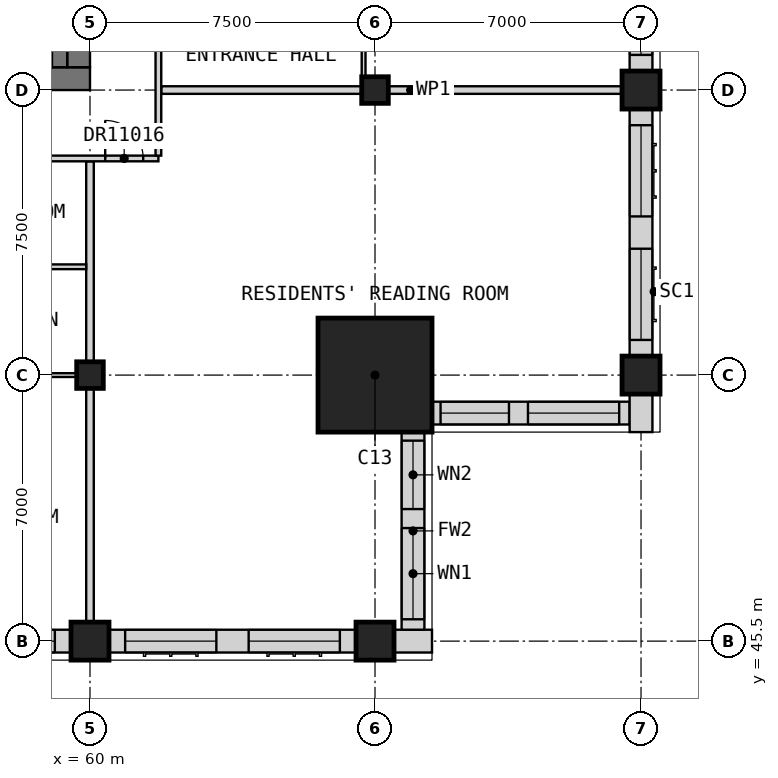
"""IFC4 building model, lengths in metres.
Left out: names, types, materials, properties, quantities, classifications, styles, units other than length and angle.
Written with IfcOpenShell. Run it as: python <this file> out.ifc"""

import sys

from ifc_helpers import new_model, si_unit, direction, frame, frame_2d, origin, origin_2d, place, context, subcontext, project, spatial, rectangle, extrude, element, fill, save


model = new_model("IFC4")
c1 = context("Model", 3, precision=1e-05, world=origin(), true_north=direction((0.0, 1.0)))
c2 = subcontext(c1, "Body", "Model", "MODEL_VIEW")
j1 = project(units=[si_unit("LENGTHUNIT", "METRE"), si_unit("PLANEANGLEUNIT", "RADIAN")], contexts=[c1])
p1 = place(None, origin())
s1 = spatial("IfcSite", under=j1, at=p1, CompositionType="ELEMENT")
p2 = place(p1, origin())
s2 = spatial("IfcBuilding", under=s1, at=p2, CompositionType="ELEMENT")
p3 = place(p2, frame((0.0, 0.0, 276.7)))
s3 = spatial("IfcBuildingStorey", under=s2, at=p3, CompositionType="ELEMENT", Elevation=276.7)
p4 = place(p3, frame((60.0, 45.5, 0.0), z_axis=(0.0, 0.0, 1.0), x_axis=(1.0, 0.0, 0.0)))
e1 = element("IfcColumn", 1, at=p4, inside=s3, PredefinedType="COLUMN", context=c2, shape_type="SweptSolid", body=[
    extrude(rectangle(XDim=1.0, YDim=1.0, at=origin_2d()), origin(), (0.0, 0.0, 1.0), 3.5),
])
p5 = place(p3, frame((60.0, 52.5, 0.0), z_axis=(0.0, 0.0, 1.0), x_axis=(1.0, 0.0, 0.0)))
e2 = element("IfcColumn", 2, at=p5, inside=s3, PredefinedType="COLUMN", context=c2, shape_type="SweptSolid", body=[
    extrude(rectangle(XDim=0.7, YDim=0.7, at=origin_2d()), origin(), (0.0, 0.0, 1.0), 3.5),
])
p6 = place(p3, frame((67.5, 45.5, 0.0), z_axis=(0.0, 0.0, 1.0), x_axis=(1.0, 0.0, 0.0)))
e3 = element("IfcColumn", 3, at=p6, inside=s3, PredefinedType="COLUMN", context=c2, shape_type="SweptSolid", body=[
    extrude(rectangle(XDim=1.0, YDim=1.0, at=origin_2d()), origin(), (0.0, 0.0, 1.0), 3.5),
])
p7 = place(p3, frame((67.5, 60.0, 0.0), z_axis=(0.0, 0.0, 1.0), x_axis=(1.0, 0.0, 0.0)))
e4 = element("IfcColumn", 4, at=p7, inside=s3, PredefinedType="COLUMN", context=c2, shape_type="SweptSolid", body=[
    extrude(rectangle(XDim=0.7, YDim=0.7, at=origin_2d()), origin(), (0.0, 0.0, 1.0), 3.5),
])
for number, where, z_axis, x_axis in (
    (5, (74.5, 52.5, 0.0), (0.0, 0.0, 1.0), (1.0, 0.0, 0.0)),
    (6, (74.5, 60.0, 0.0), (0.0, 0.0, 1.0), (1.0, 0.0, 0.0)),
):
    element("IfcColumn", number, at=place(p3, frame(where, z_axis=z_axis, x_axis=x_axis)), inside=s3, PredefinedType="COLUMN", context=c2, shape_type="SweptSolid", body=[
        extrude(rectangle(XDim=1.0, YDim=1.0, at=origin_2d()), origin(), (0.0, 0.0, 1.0), 3.5),
    ])
p8 = place(p3, frame((67.5, 52.5, 0.0), z_axis=(0.0, 0.0, 1.0), x_axis=(1.0, 0.0, 0.0)))
e7 = element("IfcColumn", 7, at=p8, inside=s3, PredefinedType="COLUMN", context=c2, shape_type="SweptSolid", body=[
    extrude(rectangle(XDim=3.0, YDim=3.0, at=origin_2d()), origin(), (0.0, 0.0, 1.0), 3.5),
])
p9 = place(p3, frame((30.0, 60.3, 0.0), z_axis=(0.0, 0.0, 1.0), x_axis=(1.0, 0.0, 0.0)))
e8 = element("IfcWall", 8, at=p9, inside=s3, PredefinedType="SHEAR", context=c2, shape_type="SweptSolid", body=[
    extrude(rectangle(XDim=30.0, YDim=0.6, at=frame_2d((15.0, 0.0))), origin(), (0.0, 0.0, 1.0), 3.5),
])
p10 = place(p9, frame((21.9, 0.0, 0.0)))
e9 = element("IfcOpeningElement", 9, at=p10, cuts=e8, PredefinedType="OPENING", context=c2, shape_type="SweptSolid", body=[
    extrude(rectangle(XDim=1.8, YDim=2.1, at=frame_2d((0.9, 1.05))), frame((0.0, 0.31, 0.0), z_axis=(0.0, -1.0, 0.0), x_axis=(1.0, 0.0, 0.0)), (0.0, 0.0, 1.0), 0.62),
])
p11 = place(p9, frame((26.5, 0.0, 0.0)))
e10 = element("IfcOpeningElement", 10, at=p11, cuts=e8, PredefinedType="OPENING", context=c2, shape_type="SweptSolid", body=[
    extrude(rectangle(XDim=1.2, YDim=2.1, at=frame_2d((0.6, 1.05))), frame((0.0, 0.31, 0.0), z_axis=(0.0, -1.0, 0.0), x_axis=(1.0, 0.0, 0.0)), (0.0, 0.0, 1.0), 0.62),
])
p12 = place(p3, frame((59.7, 60.6, 0.0), z_axis=(0.0, 0.0, 1.0), x_axis=(0.0, 1.0, 0.0)))
e11 = element("IfcWall", 11, at=p12, inside=s3, PredefinedType="SHEAR", context=c2, shape_type="SweptSolid", body=[
    extrude(rectangle(XDim=21.3, YDim=0.6, at=frame_2d((10.65, 0.0))), origin(), (0.0, 0.0, 1.0), 3.5),
])
p13 = place(p12, frame((14.9, 0.0, 0.0)))
e12 = element("IfcOpeningElement", 12, at=p13, cuts=e11, PredefinedType="OPENING", context=c2, shape_type="SweptSolid", body=[
    extrude(rectangle(XDim=1.8, YDim=2.1, at=frame_2d((0.9, 1.05))), frame((0.0, 0.31, 0.0), z_axis=(0.0, -1.0, 0.0), x_axis=(1.0, 0.0, 0.0)), (0.0, 0.0, 1.0), 0.62),
])
p14 = place(p3, frame((53.0, 45.5, 0.0), z_axis=(0.0, 0.0, 1.0), x_axis=(1.0, 0.0, 0.0)))
e13 = element("IfcWall", 13, at=p14, inside=s3, PredefinedType="SOLIDWALL", context=c2, shape_type="SweptSolid", body=[
    extrude(rectangle(XDim=6.5, YDim=0.6, at=frame_2d((3.25, 0.0))), origin(), (0.0, 0.0, 1.0), 2.75),
])
p15 = place(p14, frame((0.425, 0.0, 0.8)))
e14 = element("IfcOpeningElement", 14, at=p15, cuts=e13, PredefinedType="OPENING", context=c2, shape_type="SweptSolid", body=[
    extrude(rectangle(XDim=2.4, YDim=1.8, at=frame_2d((1.2, 0.9))), frame((0.0, 0.31, 0.0), z_axis=(0.0, -1.0, 0.0), x_axis=(1.0, 0.0, 0.0)), (0.0, 0.0, 1.0), 0.62),
])
p16 = place(p14, frame((3.675, 0.0, 0.8)))
e15 = element("IfcOpeningElement", 15, at=p16, cuts=e13, PredefinedType="OPENING", context=c2, shape_type="SweptSolid", body=[
    extrude(rectangle(XDim=2.4, YDim=1.8, at=frame_2d((1.2, 0.9))), frame((0.0, 0.31, 0.0), z_axis=(0.0, -1.0, 0.0), x_axis=(1.0, 0.0, 0.0)), (0.0, 0.0, 1.0), 0.62),
])
p17 = place(p3, frame((60.5, 45.5, 0.0), z_axis=(0.0, 0.0, 1.0), x_axis=(1.0, 0.0, 0.0)))
e16 = element("IfcWall", 16, at=p17, inside=s3, PredefinedType="SOLIDWALL", context=c2, shape_type="SweptSolid", body=[
    extrude(rectangle(XDim=6.5, YDim=0.6, at=frame_2d((3.25, 0.0))), origin(), (0.0, 0.0, 1.0), 2.75),
])
p18 = place(p17, frame((0.425, 0.0, 0.8)))
e17 = element("IfcOpeningElement", 17, at=p18, cuts=e16, PredefinedType="OPENING", context=c2, shape_type="SweptSolid", body=[
    extrude(rectangle(XDim=2.4, YDim=1.8, at=frame_2d((1.2, 0.9))), frame((0.0, 0.31, 0.0), z_axis=(0.0, -1.0, 0.0), x_axis=(1.0, 0.0, 0.0)), (0.0, 0.0, 1.0), 0.62),
])
p19 = place(p17, frame((3.675, 0.0, 0.8)))
e18 = element("IfcOpeningElement", 18, at=p19, cuts=e16, PredefinedType="OPENING", context=c2, shape_type="SweptSolid", body=[
    extrude(rectangle(XDim=2.4, YDim=1.8, at=frame_2d((1.2, 0.9))), frame((0.0, 0.31, 0.0), z_axis=(0.0, -1.0, 0.0), x_axis=(1.0, 0.0, 0.0)), (0.0, 0.0, 1.0), 0.62),
])
p20 = place(p3, frame((68.0, 45.5, 0.0), z_axis=(0.0, 0.0, 1.0), x_axis=(1.0, 0.0, 0.0)))
e19 = element("IfcWall", 19, at=p20, inside=s3, PredefinedType="SOLIDWALL", context=c2, shape_type="SweptSolid", body=[
    extrude(rectangle(XDim=1.0, YDim=0.6, at=frame_2d((0.5, 0.0))), origin(), (0.0, 0.0, 1.0), 3.25),
])
p21 = place(p3, frame((68.5, 45.8, 0.0), z_axis=(0.0, 0.0, 1.0), x_axis=(0.0, 1.0, 0.0)))
e20 = element("IfcWall", 20, at=p21, inside=s3, PredefinedType="SOLIDWALL", context=c2, shape_type="SweptSolid", body=[
    extrude(rectangle(XDim=5.2, YDim=0.6, at=frame_2d((2.6, 0.0))), origin(), (0.0, 0.0, 1.0), 3.25),
])
p22 = place(p21, frame((0.275, 0.0, 0.8)))
e21 = element("IfcOpeningElement", 21, at=p22, cuts=e20, PredefinedType="OPENING", context=c2, shape_type="SweptSolid", body=[
    extrude(rectangle(XDim=2.4, YDim=1.8, at=frame_2d((1.2, 0.9))), frame((0.0, 0.31, 0.0), z_axis=(0.0, -1.0, 0.0), x_axis=(1.0, 0.0, 0.0)), (0.0, 0.0, 1.0), 0.62),
])
p23 = place(p21, frame((3.175, 0.0, 0.8)))
e22 = element("IfcOpeningElement", 22, at=p23, cuts=e20, PredefinedType="OPENING", context=c2, shape_type="SweptSolid", body=[
    extrude(rectangle(XDim=1.8, YDim=1.8, at=frame_2d((0.9, 0.9))), frame((0.0, 0.31, 0.0), z_axis=(0.0, -1.0, 0.0), x_axis=(1.0, 0.0, 0.0)), (0.0, 0.0, 1.0), 0.62),
])
p24 = place(p3, frame((69.0, 51.5, 0.0), z_axis=(0.0, 0.0, 1.0), x_axis=(1.0, 0.0, 0.0)))
e23 = element("IfcWall", 23, at=p24, inside=s3, PredefinedType="SOLIDWALL", context=c2, shape_type="SweptSolid", body=[
    extrude(rectangle(XDim=5.2, YDim=0.6, at=frame_2d((2.6, 0.0))), origin(), (0.0, 0.0, 1.0), 3.25),
])
p25 = place(p24, frame((0.225, 0.0, 0.8)))
e24 = element("IfcOpeningElement", 24, at=p25, cuts=e23, PredefinedType="OPENING", context=c2, shape_type="SweptSolid", body=[
    extrude(rectangle(XDim=1.8, YDim=1.8, at=frame_2d((0.9, 0.9))), frame((0.0, 0.31, 0.0), z_axis=(0.0, -1.0, 0.0), x_axis=(1.0, 0.0, 0.0)), (0.0, 0.0, 1.0), 0.62),
])
p26 = place(p24, frame((2.525, 0.0, 0.8)))
e25 = element("IfcOpeningElement", 25, at=p26, cuts=e23, PredefinedType="OPENING", context=c2, shape_type="SweptSolid", body=[
    extrude(rectangle(XDim=2.4, YDim=1.8, at=frame_2d((1.2, 0.9))), frame((0.0, 0.31, 0.0), z_axis=(0.0, -1.0, 0.0), x_axis=(1.0, 0.0, 0.0)), (0.0, 0.0, 1.0), 0.62),
])
p27 = place(p3, frame((74.5, 51.0, 0.0), z_axis=(0.0, 0.0, 1.0), x_axis=(0.0, 1.0, 0.0)))
e26 = element("IfcWall", 26, at=p27, inside=s3, PredefinedType="SOLIDWALL", context=c2, shape_type="SweptSolid", body=[
    extrude(rectangle(XDim=1.0, YDim=0.6, at=frame_2d((0.5, 0.0))), origin(), (0.0, 0.0, 1.0), 3.25),
])
p28 = place(p3, frame((74.5, 53.0, 0.0), z_axis=(0.0, 0.0, 1.0), x_axis=(0.0, 1.0, 0.0)))
e27 = element("IfcWall", 27, at=p28, inside=s3, PredefinedType="SOLIDWALL", context=c2, shape_type="SweptSolid", body=[
    extrude(rectangle(XDim=6.5, YDim=0.6, at=frame_2d((3.25, 0.0))), origin(), (0.0, 0.0, 1.0), 2.75),
])
p29 = place(p28, frame((0.425, 0.0, 0.8)))
e28 = element("IfcOpeningElement", 28, at=p29, cuts=e27, PredefinedType="OPENING", context=c2, shape_type="SweptSolid", body=[
    extrude(rectangle(XDim=2.4, YDim=1.8, at=frame_2d((1.2, 0.9))), frame((0.0, 0.31, 0.0), z_axis=(0.0, -1.0, 0.0), x_axis=(1.0, 0.0, 0.0)), (0.0, 0.0, 1.0), 0.62),
])
p30 = place(p28, frame((3.675, 0.0, 0.8)))
e29 = element("IfcOpeningElement", 29, at=p30, cuts=e27, PredefinedType="OPENING", context=c2, shape_type="SweptSolid", body=[
    extrude(rectangle(XDim=2.4, YDim=1.8, at=frame_2d((1.2, 0.9))), frame((0.0, 0.31, 0.0), z_axis=(0.0, -1.0, 0.0), x_axis=(1.0, 0.0, 0.0)), (0.0, 0.0, 1.0), 0.62),
])
p31 = place(p3, frame((74.5, 60.5, 0.0), z_axis=(0.0, 0.0, 1.0), x_axis=(0.0, 1.0, 0.0)))
e30 = element("IfcWall", 30, at=p31, inside=s3, PredefinedType="SOLIDWALL", context=c2, shape_type="SweptSolid", body=[
    extrude(rectangle(XDim=6.5, YDim=0.6, at=frame_2d((3.25, 0.0))), origin(), (0.0, 0.0, 1.0), 2.75),
])
p32 = place(p31, frame((0.425, 0.0, 0.8)))
e31 = element("IfcOpeningElement", 31, at=p32, cuts=e30, PredefinedType="OPENING", context=c2, shape_type="SweptSolid", body=[
    extrude(rectangle(XDim=2.4, YDim=1.8, at=frame_2d((1.2, 0.9))), frame((0.0, 0.31, 0.0), z_axis=(0.0, -1.0, 0.0), x_axis=(1.0, 0.0, 0.0)), (0.0, 0.0, 1.0), 0.62),
])
p33 = place(p31, frame((3.675, 0.0, 0.8)))
e32 = element("IfcOpeningElement", 32, at=p33, cuts=e30, PredefinedType="OPENING", context=c2, shape_type="SweptSolid", body=[
    extrude(rectangle(XDim=2.4, YDim=1.8, at=frame_2d((1.2, 0.9))), frame((0.0, 0.31, 0.0), z_axis=(0.0, -1.0, 0.0), x_axis=(1.0, 0.0, 0.0)), (0.0, 0.0, 1.0), 0.62),
])
p34 = place(p3, frame((59.2, 60.6, 0.0), z_axis=(0.0, 0.0, 1.0), x_axis=(0.0, 1.0, 0.0)))
e33 = element("IfcWall", 33, at=p34, inside=s3, PredefinedType="SOLIDWALL", context=c2, shape_type="SweptSolid", body=[
    extrude(rectangle(XDim=7.9, YDim=0.4, at=frame_2d((3.95, 0.0))), origin(), (0.0, 0.0, 1.0), 3.25),
])
for number, where, z_axis, x_axis in (
    (34, (61.875, 60.0, 0.0), (0.0, 0.0, 1.0), (1.0, 0.0, 0.0)),
    (35, (60.0, 45.0, 0.0), (0.0, 0.0, 1.0), (0.0, 1.0, 0.0)),
):
    element("IfcWall", number, at=place(p3, frame(where, z_axis=z_axis, x_axis=x_axis)), inside=s3, PredefinedType="PARTITIONING", context=c2, shape_type="SweptSolid", body=[
        extrude(rectangle(XDim=13.125, YDim=0.2, at=frame_2d((6.562, 0.0))), origin(), (0.0, 0.0, 1.0), 3.25),
    ])
p35 = place(p3, frame((33.75, 58.2, 0.0), z_axis=(0.0, 0.0, 1.0), x_axis=(1.0, 0.0, 0.0)))
e36 = element("IfcWall", 36, at=p35, inside=s3, PredefinedType="PARTITIONING", context=c2, shape_type="SweptSolid", body=[
    extrude(rectangle(XDim=28.05, YDim=0.15, at=frame_2d((14.025, 0.0))), origin(), (0.0, 0.0, 1.0), 3.25),
])
p36 = place(p35, frame((1.375, 0.0, 0.0)))
e37 = element("IfcOpeningElement", 37, at=p36, cuts=e36, PredefinedType="OPENING", context=c2, shape_type="SweptSolid", body=[
    extrude(rectangle(XDim=1.0, YDim=2.1, at=frame_2d((0.5, 1.05))), frame((0.0, 0.085, 0.0), z_axis=(0.0, -1.0, 0.0), x_axis=(1.0, 0.0, 0.0)), (0.0, 0.0, 1.0), 0.17),
])
p37 = place(p35, frame((5.175, 0.0, 0.0)))
e38 = element("IfcOpeningElement", 38, at=p37, cuts=e36, PredefinedType="OPENING", context=c2, shape_type="SweptSolid", body=[
    extrude(rectangle(XDim=0.9, YDim=2.1, at=frame_2d((0.45, 1.05))), frame((0.0, 0.085, 0.0), z_axis=(0.0, -1.0, 0.0), x_axis=(1.0, 0.0, 0.0)), (0.0, 0.0, 1.0), 0.17),
])
p38 = place(p35, frame((12.675, 0.0, 0.0)))
e39 = element("IfcOpeningElement", 39, at=p38, cuts=e36, PredefinedType="OPENING", context=c2, shape_type="SweptSolid", body=[
    extrude(rectangle(XDim=0.9, YDim=2.1, at=frame_2d((0.45, 1.05))), frame((0.0, 0.085, 0.0), z_axis=(0.0, -1.0, 0.0), x_axis=(1.0, 0.0, 0.0)), (0.0, 0.0, 1.0), 0.17),
])
p39 = place(p35, frame((20.175, 0.0, 0.0)))
e40 = element("IfcOpeningElement", 40, at=p39, cuts=e36, PredefinedType="OPENING", context=c2, shape_type="SweptSolid", body=[
    extrude(rectangle(XDim=0.9, YDim=2.1, at=frame_2d((0.45, 1.05))), frame((0.0, 0.085, 0.0), z_axis=(0.0, -1.0, 0.0), x_axis=(1.0, 0.0, 0.0)), (0.0, 0.0, 1.0), 0.17),
])
p40 = place(p35, frame((26.65, 0.0, 0.0)))
e41 = element("IfcOpeningElement", 41, at=p40, cuts=e36, PredefinedType="OPENING", context=c2, shape_type="SweptSolid", body=[
    extrude(rectangle(XDim=1.0, YDim=2.1, at=frame_2d((0.5, 1.05))), frame((0.0, 0.085, 0.0), z_axis=(0.0, -1.0, 0.0), x_axis=(1.0, 0.0, 0.0)), (0.0, 0.0, 1.0), 0.17),
])
p41 = place(p3, frame((61.8, 58.275, 0.0), z_axis=(0.0, 0.0, 1.0), x_axis=(0.0, 1.0, 0.0)))
e42 = element("IfcWall", 42, at=p41, inside=s3, PredefinedType="PARTITIONING", context=c2, shape_type="SweptSolid", body=[
    extrude(rectangle(XDim=25.95, YDim=0.15, at=frame_2d((12.975, 0.0))), origin(), (0.0, 0.0, 1.0), 3.25),
])
p42 = place(p41, frame((3.15, 0.0, 0.0)))
e43 = element("IfcOpeningElement", 43, at=p42, cuts=e42, PredefinedType="OPENING", context=c2, shape_type="SweptSolid", body=[
    extrude(rectangle(XDim=0.9, YDim=2.1, at=frame_2d((0.45, 1.05))), frame((0.0, 0.085, 0.0), z_axis=(0.0, -1.0, 0.0), x_axis=(1.0, 0.0, 0.0)), (0.0, 0.0, 1.0), 0.17),
])
p43 = place(p41, frame((10.65, 0.0, 0.0)))
e44 = element("IfcOpeningElement", 44, at=p43, cuts=e42, PredefinedType="OPENING", context=c2, shape_type="SweptSolid", body=[
    extrude(rectangle(XDim=0.9, YDim=2.1, at=frame_2d((0.45, 1.05))), frame((0.0, 0.085, 0.0), z_axis=(0.0, -1.0, 0.0), x_axis=(1.0, 0.0, 0.0)), (0.0, 0.0, 1.0), 0.17),
])
p44 = place(p41, frame((18.15, 0.0, 0.0)))
e45 = element("IfcOpeningElement", 45, at=p44, cuts=e42, PredefinedType="OPENING", context=c2, shape_type="SweptSolid", body=[
    extrude(rectangle(XDim=0.9, YDim=2.1, at=frame_2d((0.45, 1.05))), frame((0.0, 0.085, 0.0), z_axis=(0.0, -1.0, 0.0), x_axis=(1.0, 0.0, 0.0)), (0.0, 0.0, 1.0), 0.17),
])
p45 = place(p3, frame((37.6, 52.5, 0.0), z_axis=(0.0, 0.0, 1.0), x_axis=(1.0, 0.0, 0.0)))
e46 = element("IfcWall", 46, at=p45, inside=s3, PredefinedType="PARTITIONING", context=c2, shape_type="SweptSolid", body=[
    extrude(rectangle(XDim=22.3, YDim=0.1, at=frame_2d((11.15, 0.0))), origin(), (0.0, 0.0, 1.0), 3.25),
])
p46 = place(p45, frame((1.475, 0.0, 0.0)))
e47 = element("IfcOpeningElement", 47, at=p46, cuts=e46, PredefinedType="OPENING", context=c2, shape_type="SweptSolid", body=[
    extrude(rectangle(XDim=0.9, YDim=2.1, at=frame_2d((0.45, 1.05))), frame((0.0, 0.06, 0.0), z_axis=(0.0, -1.0, 0.0), x_axis=(1.0, 0.0, 0.0)), (0.0, 0.0, 1.0), 0.12),
])
p47 = place(p45, frame((8.825, 0.0, 0.0)))
e48 = element("IfcOpeningElement", 48, at=p47, cuts=e46, PredefinedType="OPENING", context=c2, shape_type="SweptSolid", body=[
    extrude(rectangle(XDim=0.9, YDim=2.1, at=frame_2d((0.45, 1.05))), frame((0.0, 0.06, 0.0), z_axis=(0.0, -1.0, 0.0), x_axis=(1.0, 0.0, 0.0)), (0.0, 0.0, 1.0), 0.12),
])
p48 = place(p45, frame((16.325, 0.0, 0.0)))
e49 = element("IfcOpeningElement", 49, at=p48, cuts=e46, PredefinedType="OPENING", context=c2, shape_type="SweptSolid", body=[
    extrude(rectangle(XDim=0.9, YDim=2.1, at=frame_2d((0.45, 1.05))), frame((0.0, 0.06, 0.0), z_axis=(0.0, -1.0, 0.0), x_axis=(1.0, 0.0, 0.0)), (0.0, 0.0, 1.0), 0.12),
])
p49 = place(p3, frame((67.2, 60.1, 0.0), z_axis=(0.0, 0.0, 1.0), x_axis=(0.0, 1.0, 0.0)))
e50 = element("IfcWall", 50, at=p49, inside=s3, PredefinedType="PARTITIONING", context=c2, shape_type="SweptSolid", body=[
    extrude(rectangle(XDim=22.3, YDim=0.1, at=frame_2d((11.15, 0.0))), origin(), (0.0, 0.0, 1.0), 3.25),
])
p50 = place(p49, frame((1.325, 0.0, 0.0)))
e51 = element("IfcOpeningElement", 51, at=p50, cuts=e50, PredefinedType="OPENING", context=c2, shape_type="SweptSolid", body=[
    extrude(rectangle(XDim=0.9, YDim=2.1, at=frame_2d((0.45, 1.05))), frame((0.0, 0.06, 0.0), z_axis=(0.0, -1.0, 0.0), x_axis=(1.0, 0.0, 0.0)), (0.0, 0.0, 1.0), 0.12),
])
p51 = place(p49, frame((8.825, 0.0, 0.0)))
e52 = element("IfcOpeningElement", 52, at=p51, cuts=e50, PredefinedType="OPENING", context=c2, shape_type="SweptSolid", body=[
    extrude(rectangle(XDim=0.9, YDim=2.1, at=frame_2d((0.45, 1.05))), frame((0.0, 0.06, 0.0), z_axis=(0.0, -1.0, 0.0), x_axis=(1.0, 0.0, 0.0)), (0.0, 0.0, 1.0), 0.12),
])
p52 = place(p49, frame((16.325, 0.0, 0.0)))
e53 = element("IfcOpeningElement", 53, at=p52, cuts=e50, PredefinedType="OPENING", context=c2, shape_type="SweptSolid", body=[
    extrude(rectangle(XDim=0.9, YDim=2.1, at=frame_2d((0.45, 1.05))), frame((0.0, 0.06, 0.0), z_axis=(0.0, -1.0, 0.0), x_axis=(1.0, 0.0, 0.0)), (0.0, 0.0, 1.0), 0.12),
])
p53 = place(p3, frame((56.25, 55.35, 0.0), z_axis=(0.0, 0.0, 1.0), x_axis=(1.0, 0.0, 0.0)))
e54 = element("IfcWall", 54, at=p53, inside=s3, PredefinedType="PARTITIONING", context=c2, shape_type="SweptSolid", body=[
    extrude(rectangle(XDim=3.65, YDim=0.125, at=frame_2d((1.825, 0.0))), origin(), (0.0, 0.0, 1.0), 3.25),
])
p54 = place(p16, origin())
e55 = element("IfcWindow", 55, at=p54, inside=s3, PartitioningType="SINGLE_PANEL", PredefinedType="WINDOW", context=c2, shape_type="SweptSolid", body=[
    extrude(rectangle(XDim=2.4, YDim=1.8, at=frame_2d((1.2, 0.9))), frame((0.0, -0.07, 0.0), z_axis=(0.0, -1.0, 0.0), x_axis=(1.0, 0.0, 0.0)), (0.0, 0.0, 1.0), 0.06),
])
fill(e15, e55)
p55 = place(p18, origin())
e56 = element("IfcWindow", 56, at=p55, inside=s3, PartitioningType="SINGLE_PANEL", PredefinedType="WINDOW", context=c2, shape_type="SweptSolid", body=[
    extrude(rectangle(XDim=2.4, YDim=1.8, at=frame_2d((1.2, 0.9))), frame((0.0, -0.07, 0.0), z_axis=(0.0, -1.0, 0.0), x_axis=(1.0, 0.0, 0.0)), (0.0, 0.0, 1.0), 0.06),
])
fill(e17, e56)
p56 = place(p19, origin())
e57 = element("IfcWindow", 57, at=p56, inside=s3, PartitioningType="SINGLE_PANEL", PredefinedType="WINDOW", context=c2, shape_type="SweptSolid", body=[
    extrude(rectangle(XDim=2.4, YDim=1.8, at=frame_2d((1.2, 0.9))), frame((0.0, -0.07, 0.0), z_axis=(0.0, -1.0, 0.0), x_axis=(1.0, 0.0, 0.0)), (0.0, 0.0, 1.0), 0.06),
])
fill(e18, e57)
p57 = place(p22, origin())
e58 = element("IfcWindow", 58, at=p57, inside=s3, PartitioningType="SINGLE_PANEL", PredefinedType="WINDOW", context=c2, shape_type="SweptSolid", body=[
    extrude(rectangle(XDim=2.4, YDim=1.8, at=frame_2d((1.2, 0.9))), frame((0.0, -0.07, 0.0), z_axis=(0.0, -1.0, 0.0), x_axis=(1.0, 0.0, 0.0)), (0.0, 0.0, 1.0), 0.06),
])
fill(e21, e58)
p58 = place(p23, origin())
e59 = element("IfcWindow", 59, at=p58, inside=s3, PartitioningType="SINGLE_PANEL", PredefinedType="WINDOW", context=c2, shape_type="SweptSolid", body=[
    extrude(rectangle(XDim=1.8, YDim=1.8, at=frame_2d((0.9, 0.9))), frame((0.0, -0.07, 0.0), z_axis=(0.0, -1.0, 0.0), x_axis=(1.0, 0.0, 0.0)), (0.0, 0.0, 1.0), 0.06),
])
fill(e22, e59)
p59 = place(p25, origin())
e60 = element("IfcWindow", 60, at=p59, inside=s3, PartitioningType="SINGLE_PANEL", PredefinedType="WINDOW", context=c2, shape_type="SweptSolid", body=[
    extrude(rectangle(XDim=1.8, YDim=1.8, at=frame_2d((0.9, 0.9))), frame((0.0, -0.07, 0.0), z_axis=(0.0, -1.0, 0.0), x_axis=(1.0, 0.0, 0.0)), (0.0, 0.0, 1.0), 0.06),
])
fill(e24, e60)
p60 = place(p26, origin())
e61 = element("IfcWindow", 61, at=p60, inside=s3, PartitioningType="SINGLE_PANEL", PredefinedType="WINDOW", context=c2, shape_type="SweptSolid", body=[
    extrude(rectangle(XDim=2.4, YDim=1.8, at=frame_2d((1.2, 0.9))), frame((0.0, -0.07, 0.0), z_axis=(0.0, -1.0, 0.0), x_axis=(1.0, 0.0, 0.0)), (0.0, 0.0, 1.0), 0.06),
])
fill(e25, e61)
p61 = place(p29, origin())
e62 = element("IfcWindow", 62, at=p61, inside=s3, PartitioningType="SINGLE_PANEL", PredefinedType="WINDOW", context=c2, shape_type="SweptSolid", body=[
    extrude(rectangle(XDim=2.4, YDim=1.8, at=frame_2d((1.2, 0.9))), frame((0.0, -0.07, 0.0), z_axis=(0.0, -1.0, 0.0), x_axis=(1.0, 0.0, 0.0)), (0.0, 0.0, 1.0), 0.06),
])
fill(e28, e62)
p62 = place(p30, origin())
e63 = element("IfcWindow", 63, at=p62, inside=s3, PartitioningType="SINGLE_PANEL", PredefinedType="WINDOW", context=c2, shape_type="SweptSolid", body=[
    extrude(rectangle(XDim=2.4, YDim=1.8, at=frame_2d((1.2, 0.9))), frame((0.0, -0.07, 0.0), z_axis=(0.0, -1.0, 0.0), x_axis=(1.0, 0.0, 0.0)), (0.0, 0.0, 1.0), 0.06),
])
fill(e29, e63)
p63 = place(p32, origin())
e64 = element("IfcWindow", 64, at=p63, inside=s3, PartitioningType="SINGLE_PANEL", PredefinedType="WINDOW", context=c2, shape_type="SweptSolid", body=[
    extrude(rectangle(XDim=2.4, YDim=1.8, at=frame_2d((1.2, 0.9))), frame((0.0, -0.07, 0.0), z_axis=(0.0, -1.0, 0.0), x_axis=(1.0, 0.0, 0.0)), (0.0, 0.0, 1.0), 0.06),
])
fill(e31, e64)
p64 = place(p40, origin())
e65 = element("IfcDoor", 65, at=p64, inside=s3, OperationType="SINGLE_SWING_RIGHT", PredefinedType="DOOR", context=c2, shape_type="SweptSolid", body=[
    extrude(rectangle(XDim=1.0, YDim=2.1, at=frame_2d((0.5, 1.05))), frame((0.0, 0.025, 0.0), z_axis=(0.0, -1.0, 0.0), x_axis=(1.0, 0.0, 0.0)), (0.0, 0.0, 1.0), 0.05),
])
fill(e41, e65)
save(model, sys.argv[1])
